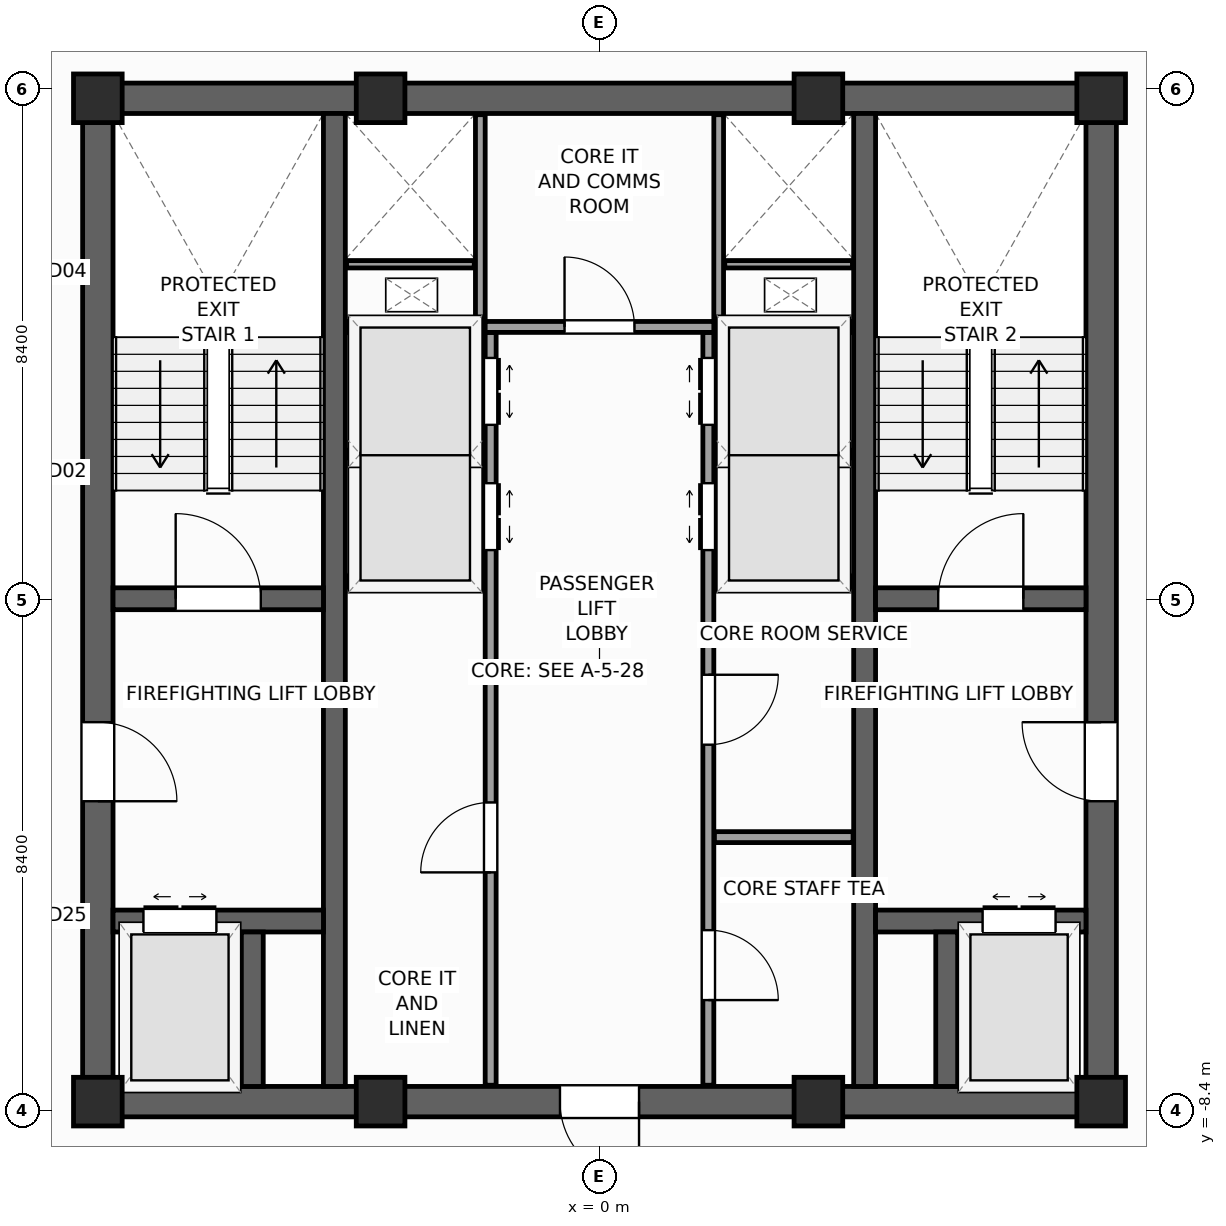
"""IFC4 building model, lengths in metres.
Left out: names, types, materials, properties, quantities, classifications, styles, units other than length and angle.
Written with IfcOpenShell. Run it as: python <this file> out.ifc"""

import sys

from ifc_helpers import new_model, si_unit, direction, frame, frame_2d, origin, origin_2d, place, context, subcontext, project, spatial, rectangle, extrude, source, transform, mapped, element, fill, save


model = new_model("IFC4")
c1 = context("Model", 3, precision=1e-05, world=origin(), true_north=direction((0.0, 1.0)))
c2 = subcontext(c1, "Body", "Model", "MODEL_VIEW")
j1 = project(units=[si_unit("LENGTHUNIT", "METRE"), si_unit("PLANEANGLEUNIT", "RADIAN")], contexts=[c1])
p1 = place(None, origin())
s1 = spatial("IfcSite", under=j1, at=p1, CompositionType="ELEMENT")
p2 = place(p1, origin())
s2 = spatial("IfcBuilding", under=s1, at=p2, CompositionType="ELEMENT")
p3 = place(p2, frame((0.0, 0.0, 301.2)))
s3 = spatial("IfcBuildingStorey", under=s2, at=p3, CompositionType="ELEMENT", Elevation=301.2)
p4 = place(p3, frame((-8.5, -8.25, 0.0), z_axis=(0.0, 0.0, 1.0), x_axis=(1.0, 0.0, 0.0)))
e1 = element("IfcWall", 1, at=p4, inside=s3, PredefinedType="SHEAR", context=c2, shape_type="SweptSolid", body=[
    extrude(rectangle(XDim=17.0, YDim=0.5, at=frame_2d((8.5, 0.0))), origin(), (0.0, 0.0, 1.0), 3.6),
])
p5 = place(p4, frame((7.85, 0.0, 0.0)))
e2 = element("IfcOpeningElement", 2, at=p5, cuts=e1, PredefinedType="OPENING", context=c2, shape_type="SweptSolid", body=[
    extrude(rectangle(XDim=1.3, YDim=2.2, at=frame_2d((0.65, 1.1))), frame((0.0, 0.26, 0.0), z_axis=(0.0, -1.0, 0.0), x_axis=(1.0, 0.0, 0.0)), (0.0, 0.0, 1.0), 0.52),
])
p6 = place(p3, frame((-8.5, 8.25, 0.0), z_axis=(0.0, 0.0, 1.0), x_axis=(1.0, 0.0, 0.0)))
e3 = element("IfcWall", 3, at=p6, inside=s3, PredefinedType="SHEAR", context=c2, shape_type="SweptSolid", body=[
    extrude(rectangle(XDim=17.0, YDim=0.5, at=frame_2d((8.5, 0.0))), origin(), (0.0, 0.0, 1.0), 3.6),
])
p7 = place(p3, frame((-8.25, -8.0, 0.0), z_axis=(0.0, 0.0, 1.0), x_axis=(0.0, 1.0, 0.0)))
e4 = element("IfcWall", 4, at=p7, inside=s3, PredefinedType="SHEAR", context=c2, shape_type="SweptSolid", body=[
    extrude(rectangle(XDim=16.0, YDim=0.5, at=frame_2d((8.0, 0.0))), origin(), (0.0, 0.0, 1.0), 3.6),
])
p8 = place(p7, frame((4.69, 0.0, 0.0)))
e5 = element("IfcOpeningElement", 5, at=p8, cuts=e4, PredefinedType="OPENING", context=c2, shape_type="SweptSolid", body=[
    extrude(rectangle(XDim=1.3, YDim=2.2, at=frame_2d((0.65, 1.1))), frame((0.0, 0.26, 0.0), z_axis=(0.0, -1.0, 0.0), x_axis=(1.0, 0.0, 0.0)), (0.0, 0.0, 1.0), 0.52),
])
p9 = place(p3, frame((8.25, -8.0, 0.0), z_axis=(0.0, 0.0, 1.0), x_axis=(0.0, 1.0, 0.0)))
e6 = element("IfcWall", 6, at=p9, inside=s3, PredefinedType="SHEAR", context=c2, shape_type="SweptSolid", body=[
    extrude(rectangle(XDim=16.0, YDim=0.5, at=frame_2d((8.0, 0.0))), origin(), (0.0, 0.0, 1.0), 3.6),
])
p10 = place(p9, frame((4.69, 0.0, 0.0)))
e7 = element("IfcOpeningElement", 7, at=p10, cuts=e6, PredefinedType="OPENING", context=c2, shape_type="SweptSolid", body=[
    extrude(rectangle(XDim=1.3, YDim=2.2, at=frame_2d((0.65, 1.1))), frame((0.0, 0.26, 0.0), z_axis=(0.0, -1.0, 0.0), x_axis=(1.0, 0.0, 0.0)), (0.0, 0.0, 1.0), 0.52),
])
for number, where, z_axis, x_axis in (
    (8, (-4.36, -8.0, 0.0), (0.0, 0.0, 1.0), (0.0, 1.0, 0.0)),
    (9, (4.36, -8.0, 0.0), (0.0, 0.0, 1.0), (0.0, 1.0, 0.0)),
):
    element("IfcWall", number, at=place(p3, frame(where, z_axis=z_axis, x_axis=x_axis)), inside=s3, PredefinedType="SHEAR", context=c2, shape_type="SweptSolid", body=[
        extrude(rectangle(XDim=16.0, YDim=0.36, at=frame_2d((8.0, 0.0))), origin(), (0.0, 0.0, 1.0), 3.6),
    ])
p11 = place(p3, frame((-8.0, 0.02, 0.0), z_axis=(0.0, 0.0, 1.0), x_axis=(1.0, 0.0, 0.0)))
e10 = element("IfcWall", 10, at=p11, inside=s3, PredefinedType="SHEAR", context=c2, shape_type="SweptSolid", body=[
    extrude(rectangle(XDim=3.46, YDim=0.36, at=frame_2d((1.73, 0.0))), origin(), (0.0, 0.0, 1.0), 3.6),
])
p12 = place(p11, frame((1.03, 0.0, 0.0)))
e11 = element("IfcOpeningElement", 11, at=p12, cuts=e10, PredefinedType="OPENING", context=c2, shape_type="SweptSolid", body=[
    extrude(rectangle(XDim=1.4, YDim=2.2, at=frame_2d((0.7, 1.1))), frame((0.0, 0.19, 0.0), z_axis=(0.0, -1.0, 0.0), x_axis=(1.0, 0.0, 0.0)), (0.0, 0.0, 1.0), 0.38),
])
p13 = place(p3, frame((4.54, 0.02, 0.0), z_axis=(0.0, 0.0, 1.0), x_axis=(1.0, 0.0, 0.0)))
e12 = element("IfcWall", 12, at=p13, inside=s3, PredefinedType="SHEAR", context=c2, shape_type="SweptSolid", body=[
    extrude(rectangle(XDim=3.46, YDim=0.36, at=frame_2d((1.73, 0.0))), origin(), (0.0, 0.0, 1.0), 3.6),
])
p14 = place(p13, frame((1.03, 0.0, 0.0)))
e13 = element("IfcOpeningElement", 13, at=p14, cuts=e12, PredefinedType="OPENING", context=c2, shape_type="SweptSolid", body=[
    extrude(rectangle(XDim=1.4, YDim=2.2, at=frame_2d((0.7, 1.1))), frame((0.0, 0.19, 0.0), z_axis=(0.0, -1.0, 0.0), x_axis=(1.0, 0.0, 0.0)), (0.0, 0.0, 1.0), 0.38),
])
p15 = place(p3, frame((-8.0, -5.28, 0.0), z_axis=(0.0, 0.0, 1.0), x_axis=(1.0, 0.0, 0.0)))
e14 = element("IfcWall", 14, at=p15, inside=s3, PredefinedType="SHEAR", context=c2, shape_type="SweptSolid", body=[
    extrude(rectangle(XDim=3.46, YDim=0.36, at=frame_2d((1.73, 0.0))), origin(), (0.0, 0.0, 1.0), 3.6),
])
p16 = place(p15, frame((0.5, 0.0, 0.0)))
e15 = element("IfcOpeningElement", 15, at=p16, cuts=e14, PredefinedType="OPENING", context=c2, shape_type="SweptSolid", body=[
    extrude(rectangle(XDim=1.2, YDim=2.25, at=frame_2d((0.6, 1.125))), frame((0.0, 0.19, 0.0), z_axis=(0.0, -1.0, 0.0), x_axis=(1.0, 0.0, 0.0)), (0.0, 0.0, 1.0), 0.38),
])
p17 = place(p3, frame((4.54, -5.28, 0.0), z_axis=(0.0, 0.0, 1.0), x_axis=(1.0, 0.0, 0.0)))
e16 = element("IfcWall", 16, at=p17, inside=s3, PredefinedType="SHEAR", context=c2, shape_type="SweptSolid", body=[
    extrude(rectangle(XDim=3.46, YDim=0.36, at=frame_2d((1.73, 0.0))), origin(), (0.0, 0.0, 1.0), 3.6),
])
p18 = place(p17, frame((1.76, 0.0, 0.0)))
e17 = element("IfcOpeningElement", 17, at=p18, cuts=e16, PredefinedType="OPENING", context=c2, shape_type="SweptSolid", body=[
    extrude(rectangle(XDim=1.2, YDim=2.25, at=frame_2d((0.6, 1.125))), frame((0.0, 0.19, 0.0), z_axis=(0.0, -1.0, 0.0), x_axis=(1.0, 0.0, 0.0)), (0.0, 0.0, 1.0), 0.38),
])
for number, where, z_axis, x_axis in (
    (18, (-5.71, -8.0, 0.0), (0.0, 0.0, 1.0), (0.0, 1.0, 0.0)),
    (19, (5.71, -8.0, 0.0), (0.0, 0.0, 1.0), (0.0, 1.0, 0.0)),
):
    element("IfcWall", number, at=place(p3, frame(where, z_axis=z_axis, x_axis=x_axis)), inside=s3, PredefinedType="SHEAR", context=c2, shape_type="SweptSolid", body=[
        extrude(rectangle(XDim=2.54, YDim=0.36, at=frame_2d((1.27, 0.0))), origin(), (0.0, 0.0, 1.0), 3.6),
    ])
m1 = source(origin(), c2, "Body", "SweptSolid", [
    extrude(rectangle(XDim=0.8, YDim=0.8, at=origin_2d()), origin(), (0.0, 0.0, 1.0), 3.6),
])
for number, where, z_axis, x_axis in (
    (20, (-8.25, -8.25, 0.0), (0.0, 0.0, 1.0), (1.0, 0.0, 0.0)),
    (21, (8.25, -8.25, 0.0), (0.0, 0.0, 1.0), (1.0, 0.0, 0.0)),
    (22, (8.25, 8.25, 0.0), (0.0, 0.0, 1.0), (1.0, 0.0, 0.0)),
    (23, (-8.25, 8.25, 0.0), (0.0, 0.0, 1.0), (1.0, 0.0, 0.0)),
    (24, (-3.6, -8.25, 0.0), (0.0, 0.0, 1.0), (1.0, 0.0, 0.0)),
    (25, (3.6, -8.25, 0.0), (0.0, 0.0, 1.0), (1.0, 0.0, 0.0)),
    (26, (-3.6, 8.25, 0.0), (0.0, 0.0, 1.0), (1.0, 0.0, 0.0)),
    (27, (3.6, 8.25, 0.0), (0.0, 0.0, 1.0), (1.0, 0.0, 0.0)),
):
    element("IfcColumn", number, at=place(p3, frame(where, z_axis=z_axis, x_axis=x_axis)), inside=s3, PredefinedType="PILASTER", context=c2, shape_type="MappedRepresentation", body=[
        mapped(m1, transform((0.0, 0.0, 0.0), scale=1.0)),
    ])
p19 = place(p3, frame((-1.79, -7.98, 0.0), z_axis=(0.0, 0.0, 1.0), x_axis=(0.0, 1.0, 0.0)))
e28 = element("IfcWall", 28, at=p19, inside=s3, PredefinedType="PARTITIONING", context=c2, shape_type="SweptSolid", body=[
    extrude(rectangle(XDim=12.38, YDim=0.18, at=frame_2d((6.19, 0.0))), origin(), (0.0, 0.0, 1.0), 3.35),
])
p20 = place(p19, frame((8.8, 0.0, 0.0)))
e29 = element("IfcOpeningElement", 29, at=p20, cuts=e28, PredefinedType="OPENING", context=c2, shape_type="SweptSolid", body=[
    extrude(rectangle(XDim=1.1, YDim=2.2, at=frame_2d((0.55, 1.1))), frame((0.0, 0.1, 0.0), z_axis=(0.0, -1.0, 0.0), x_axis=(1.0, 0.0, 0.0)), (0.0, 0.0, 1.0), 0.2),
])
p21 = place(p19, frame((10.86, 0.0, 0.0)))
e30 = element("IfcOpeningElement", 30, at=p21, cuts=e28, PredefinedType="OPENING", context=c2, shape_type="SweptSolid", body=[
    extrude(rectangle(XDim=1.1, YDim=2.2, at=frame_2d((0.55, 1.1))), frame((0.0, 0.1, 0.0), z_axis=(0.0, -1.0, 0.0), x_axis=(1.0, 0.0, 0.0)), (0.0, 0.0, 1.0), 0.2),
])
p22 = place(p19, frame((3.5, 0.0, 0.0)))
e31 = element("IfcOpeningElement", 31, at=p22, cuts=e28, PredefinedType="OPENING", context=c2, shape_type="SweptSolid", body=[
    extrude(rectangle(XDim=1.15, YDim=2.25, at=frame_2d((0.575, 1.125))), frame((0.0, 0.1, 0.0), z_axis=(0.0, -1.0, 0.0), x_axis=(1.0, 0.0, 0.0)), (0.0, 0.0, 1.0), 0.2),
])
p23 = place(p3, frame((1.79, -7.98, 0.0), z_axis=(0.0, 0.0, 1.0), x_axis=(0.0, 1.0, 0.0)))
e32 = element("IfcWall", 32, at=p23, inside=s3, PredefinedType="PARTITIONING", context=c2, shape_type="SweptSolid", body=[
    extrude(rectangle(XDim=12.38, YDim=0.18, at=frame_2d((6.19, 0.0))), origin(), (0.0, 0.0, 1.0), 3.35),
])
p24 = place(p23, frame((8.8, 0.0, 0.0)))
e33 = element("IfcOpeningElement", 33, at=p24, cuts=e32, PredefinedType="OPENING", context=c2, shape_type="SweptSolid", body=[
    extrude(rectangle(XDim=1.1, YDim=2.2, at=frame_2d((0.55, 1.1))), frame((0.0, 0.1, 0.0), z_axis=(0.0, -1.0, 0.0), x_axis=(1.0, 0.0, 0.0)), (0.0, 0.0, 1.0), 0.2),
])
p25 = place(p23, frame((10.86, 0.0, 0.0)))
e34 = element("IfcOpeningElement", 34, at=p25, cuts=e32, PredefinedType="OPENING", context=c2, shape_type="SweptSolid", body=[
    extrude(rectangle(XDim=1.1, YDim=2.2, at=frame_2d((0.55, 1.1))), frame((0.0, 0.1, 0.0), z_axis=(0.0, -1.0, 0.0), x_axis=(1.0, 0.0, 0.0)), (0.0, 0.0, 1.0), 0.2),
])
p26 = place(p23, frame((1.4, 0.0, 0.0)))
e35 = element("IfcOpeningElement", 35, at=p26, cuts=e32, PredefinedType="OPENING", context=c2, shape_type="SweptSolid", body=[
    extrude(rectangle(XDim=1.15, YDim=2.25, at=frame_2d((0.575, 1.125))), frame((0.0, 0.1, 0.0), z_axis=(0.0, -1.0, 0.0), x_axis=(1.0, 0.0, 0.0)), (0.0, 0.0, 1.0), 0.2),
])
p27 = place(p23, frame((5.6, 0.0, 0.0)))
e36 = element("IfcOpeningElement", 36, at=p27, cuts=e32, PredefinedType="OPENING", context=c2, shape_type="SweptSolid", body=[
    extrude(rectangle(XDim=1.15, YDim=2.25, at=frame_2d((0.575, 1.125))), frame((0.0, 0.1, 0.0), z_axis=(0.0, -1.0, 0.0), x_axis=(1.0, 0.0, 0.0)), (0.0, 0.0, 1.0), 0.2),
])
p28 = place(p3, frame((-1.88, 4.49, 0.0), z_axis=(0.0, 0.0, 1.0), x_axis=(1.0, 0.0, 0.0)))
e37 = element("IfcWall", 37, at=p28, inside=s3, PredefinedType="PARTITIONING", context=c2, shape_type="SweptSolid", body=[
    extrude(rectangle(XDim=3.76, YDim=0.18, at=frame_2d((1.88, 0.0))), origin(), (0.0, 0.0, 1.0), 3.35),
])
p29 = place(p28, frame((1.305, 0.0, 0.0)))
e38 = element("IfcOpeningElement", 38, at=p29, cuts=e37, PredefinedType="OPENING", context=c2, shape_type="SweptSolid", body=[
    extrude(rectangle(XDim=1.15, YDim=2.25, at=frame_2d((0.575, 1.125))), frame((0.0, 0.1, 0.0), z_axis=(0.0, -1.0, 0.0), x_axis=(1.0, 0.0, 0.0)), (0.0, 0.0, 1.0), 0.2),
])
for number, where, z_axis, x_axis in (
    (39, (1.89, -3.9, 0.0), (0.0, 0.0, 1.0), (1.0, 0.0, 0.0)),
    (40, (-4.17, 0.3, 0.0), (0.0, 0.0, 1.0), (1.0, 0.0, 0.0)),
    (41, (1.89, 0.3, 0.0), (0.0, 0.0, 1.0), (1.0, 0.0, 0.0)),
    (42, (-4.17, 4.49, 0.0), (0.0, 0.0, 1.0), (1.0, 0.0, 0.0)),
    (43, (1.89, 4.49, 0.0), (0.0, 0.0, 1.0), (1.0, 0.0, 0.0)),
):
    element("IfcWall", number, at=place(p3, frame(where, z_axis=z_axis, x_axis=x_axis)), inside=s3, PredefinedType="PARTITIONING", context=c2, shape_type="SweptSolid", body=[
        extrude(rectangle(XDim=2.28, YDim=0.18, at=frame_2d((1.14, 0.0))), origin(), (0.0, 0.0, 1.0), 3.35),
    ])
for number, where, z_axis, x_axis in (
    (44, (-4.16, 2.4, 0.0), (0.0, 0.0, 1.0), (1.0, 0.0, 0.0)),
    (45, (1.9, 2.4, 0.0), (0.0, 0.0, 1.0), (1.0, 0.0, 0.0)),
):
    element("IfcWall", number, at=place(p3, frame(where, z_axis=z_axis, x_axis=x_axis)), inside=s3, PredefinedType="PARTITIONING", context=c2, shape_type="SweptSolid", body=[
        extrude(rectangle(XDim=2.26, YDim=0.12, at=frame_2d((1.13, 0.0))), origin(), (0.0, 0.0, 1.0), 3.35),
    ])
for number, where, z_axis, x_axis in (
    (46, (-1.96, 4.58, 0.0), (0.0, 0.0, 1.0), (0.0, 1.0, 0.0)),
    (47, (1.96, 4.58, 0.0), (0.0, 0.0, 1.0), (0.0, 1.0, 0.0)),
):
    element("IfcWall", number, at=place(p3, frame(where, z_axis=z_axis, x_axis=x_axis)), inside=s3, PredefinedType="PARTITIONING", context=c2, shape_type="SweptSolid", body=[
        extrude(rectangle(XDim=3.4, YDim=0.16, at=frame_2d((1.7, 0.0))), origin(), (0.0, 0.0, 1.0), 3.35),
    ])
for number, where, z_axis, x_axis in (
    (48, (-4.16, 5.52, 0.0), (0.0, 0.0, 1.0), (1.0, 0.0, 0.0)),
    (49, (2.06, 5.52, 0.0), (0.0, 0.0, 1.0), (1.0, 0.0, 0.0)),
):
    element("IfcWall", number, at=place(p3, frame(where, z_axis=z_axis, x_axis=x_axis)), inside=s3, PredefinedType="PARTITIONING", context=c2, shape_type="SweptSolid", body=[
        extrude(rectangle(XDim=2.1, YDim=0.12, at=frame_2d((1.05, 0.0))), origin(), (0.0, 0.0, 1.0), 3.35),
    ])
m2 = source(origin(), c2, "Body", "SweptSolid", [
    extrude(rectangle(XDim=1.4, YDim=2.2, at=frame_2d((0.7, 1.1))), frame((0.0, 0.025, 0.0), z_axis=(0.0, -1.0, 0.0), x_axis=(1.0, 0.0, 0.0)), (0.0, 0.0, 1.0), 0.05),
])
p30 = place(p12, origin())
e50 = element("IfcDoor", 50, at=p30, inside=s3, OperationType="SINGLE_SWING_LEFT", PredefinedType="DOOR", context=c2, shape_type="MappedRepresentation", body=[
    mapped(m2, transform((0.0, 0.0, 0.0), scale=1.0)),
])
fill(e11, e50)
p31 = place(p14, origin())
e51 = element("IfcDoor", 51, at=p31, inside=s3, OperationType="SINGLE_SWING_RIGHT", PredefinedType="DOOR", context=c2, shape_type="MappedRepresentation", body=[
    mapped(m2, transform((0.0, 0.0, 0.0), scale=1.0)),
])
fill(e13, e51)
m3 = source(origin(), c2, "Body", "SweptSolid", [
    extrude(rectangle(XDim=1.3, YDim=2.2, at=frame_2d((0.65, 1.1))), frame((0.0, 0.025, 0.0), z_axis=(0.0, -1.0, 0.0), x_axis=(1.0, 0.0, 0.0)), (0.0, 0.0, 1.0), 0.05),
])
p32 = place(p8, frame((1.3, 0.0, 0.0), z_axis=(0.0, 0.0, 1.0), x_axis=(-1.0, 0.0, 0.0)))
e52 = element("IfcDoor", 52, at=p32, inside=s3, OperationType="SINGLE_SWING_LEFT", PredefinedType="DOOR", context=c2, shape_type="MappedRepresentation", body=[
    mapped(m3, transform((0.0, 0.0, 0.0), scale=1.0)),
])
fill(e5, e52)
p33 = place(p10, origin())
e53 = element("IfcDoor", 53, at=p33, inside=s3, OperationType="SINGLE_SWING_RIGHT", PredefinedType="DOOR", context=c2, shape_type="MappedRepresentation", body=[
    mapped(m3, transform((0.0, 0.0, 0.0), scale=1.0)),
])
fill(e7, e53)
p34 = place(p5, frame((1.3, 0.0, 0.0), z_axis=(0.0, 0.0, 1.0), x_axis=(-1.0, 0.0, 0.0)))
e54 = element("IfcDoor", 54, at=p34, inside=s3, OperationType="SINGLE_SWING_RIGHT", PredefinedType="DOOR", context=c2, shape_type="MappedRepresentation", body=[
    mapped(m3, transform((0.0, 0.0, 0.0), scale=1.0)),
])
fill(e2, e54)
m4 = source(origin(), c2, "Body", "SweptSolid", [
    extrude(rectangle(XDim=1.2, YDim=2.25, at=frame_2d((0.6, 1.125))), frame((0.0, 0.025, 0.0), z_axis=(0.0, -1.0, 0.0), x_axis=(1.0, 0.0, 0.0)), (0.0, 0.0, 1.0), 0.05),
])
p35 = place(p16, origin())
e55 = element("IfcDoor", 55, at=p35, inside=s3, OperationType="DOUBLE_DOOR_SLIDING", PredefinedType="DOOR", context=c2, shape_type="MappedRepresentation", body=[
    mapped(m4, transform((0.0, 0.0, 0.0), scale=1.0)),
])
fill(e15, e55)
p36 = place(p18, origin())
e56 = element("IfcDoor", 56, at=p36, inside=s3, OperationType="DOUBLE_DOOR_SLIDING", PredefinedType="DOOR", context=c2, shape_type="MappedRepresentation", body=[
    mapped(m4, transform((0.0, 0.0, 0.0), scale=1.0)),
])
fill(e17, e56)
m5 = source(origin(), c2, "Body", "SweptSolid", [
    extrude(rectangle(XDim=1.1, YDim=2.2, at=frame_2d((0.55, 1.1))), frame((0.0, 0.025, 0.0), z_axis=(0.0, -1.0, 0.0), x_axis=(1.0, 0.0, 0.0)), (0.0, 0.0, 1.0), 0.05),
])
p37 = place(p20, frame((1.1, 0.0, 0.0), z_axis=(0.0, 0.0, 1.0), x_axis=(-1.0, 0.0, 0.0)))
e57 = element("IfcDoor", 57, at=p37, inside=s3, OperationType="DOUBLE_DOOR_SLIDING", PredefinedType="DOOR", context=c2, shape_type="MappedRepresentation", body=[
    mapped(m5, transform((0.0, 0.0, 0.0), scale=1.0)),
])
fill(e29, e57)
p38 = place(p21, frame((1.1, 0.0, 0.0), z_axis=(0.0, 0.0, 1.0), x_axis=(-1.0, 0.0, 0.0)))
e58 = element("IfcDoor", 58, at=p38, inside=s3, OperationType="DOUBLE_DOOR_SLIDING", PredefinedType="DOOR", context=c2, shape_type="MappedRepresentation", body=[
    mapped(m5, transform((0.0, 0.0, 0.0), scale=1.0)),
])
fill(e30, e58)
p39 = place(p24, origin())
e59 = element("IfcDoor", 59, at=p39, inside=s3, OperationType="DOUBLE_DOOR_SLIDING", PredefinedType="DOOR", context=c2, shape_type="MappedRepresentation", body=[
    mapped(m5, transform((0.0, 0.0, 0.0), scale=1.0)),
])
fill(e33, e59)
p40 = place(p25, origin())
e60 = element("IfcDoor", 60, at=p40, inside=s3, OperationType="DOUBLE_DOOR_SLIDING", PredefinedType="DOOR", context=c2, shape_type="MappedRepresentation", body=[
    mapped(m5, transform((0.0, 0.0, 0.0), scale=1.0)),
])
fill(e34, e60)
m6 = source(origin(), c2, "Body", "SweptSolid", [
    extrude(rectangle(XDim=1.15, YDim=2.25, at=frame_2d((0.575, 1.125))), frame((0.0, 0.025, 0.0), z_axis=(0.0, -1.0, 0.0), x_axis=(1.0, 0.0, 0.0)), (0.0, 0.0, 1.0), 0.05),
])
p41 = place(p22, origin())
e61 = element("IfcDoor", 61, at=p41, inside=s3, OperationType="SINGLE_SWING_LEFT", PredefinedType="DOOR", context=c2, shape_type="MappedRepresentation", body=[
    mapped(m6, transform((0.0, 0.0, 0.0), scale=1.0)),
])
fill(e31, e61)
p42 = place(p26, frame((1.15, 0.0, 0.0), z_axis=(0.0, 0.0, 1.0), x_axis=(-1.0, 0.0, 0.0)))
e62 = element("IfcDoor", 62, at=p42, inside=s3, OperationType="SINGLE_SWING_LEFT", PredefinedType="DOOR", context=c2, shape_type="MappedRepresentation", body=[
    mapped(m6, transform((0.0, 0.0, 0.0), scale=1.0)),
])
fill(e35, e62)
p43 = place(p27, frame((1.15, 0.0, 0.0), z_axis=(0.0, 0.0, 1.0), x_axis=(-1.0, 0.0, 0.0)))
e63 = element("IfcDoor", 63, at=p43, inside=s3, OperationType="SINGLE_SWING_RIGHT", PredefinedType="DOOR", context=c2, shape_type="MappedRepresentation", body=[
    mapped(m6, transform((0.0, 0.0, 0.0), scale=1.0)),
])
fill(e36, e63)
p44 = place(p29, origin())
e64 = element("IfcDoor", 64, at=p44, inside=s3, OperationType="SINGLE_SWING_LEFT", PredefinedType="DOOR", context=c2, shape_type="MappedRepresentation", body=[
    mapped(m6, transform((0.0, 0.0, 0.0), scale=1.0)),
])
fill(e38, e64)
save(model, sys.argv[1])
